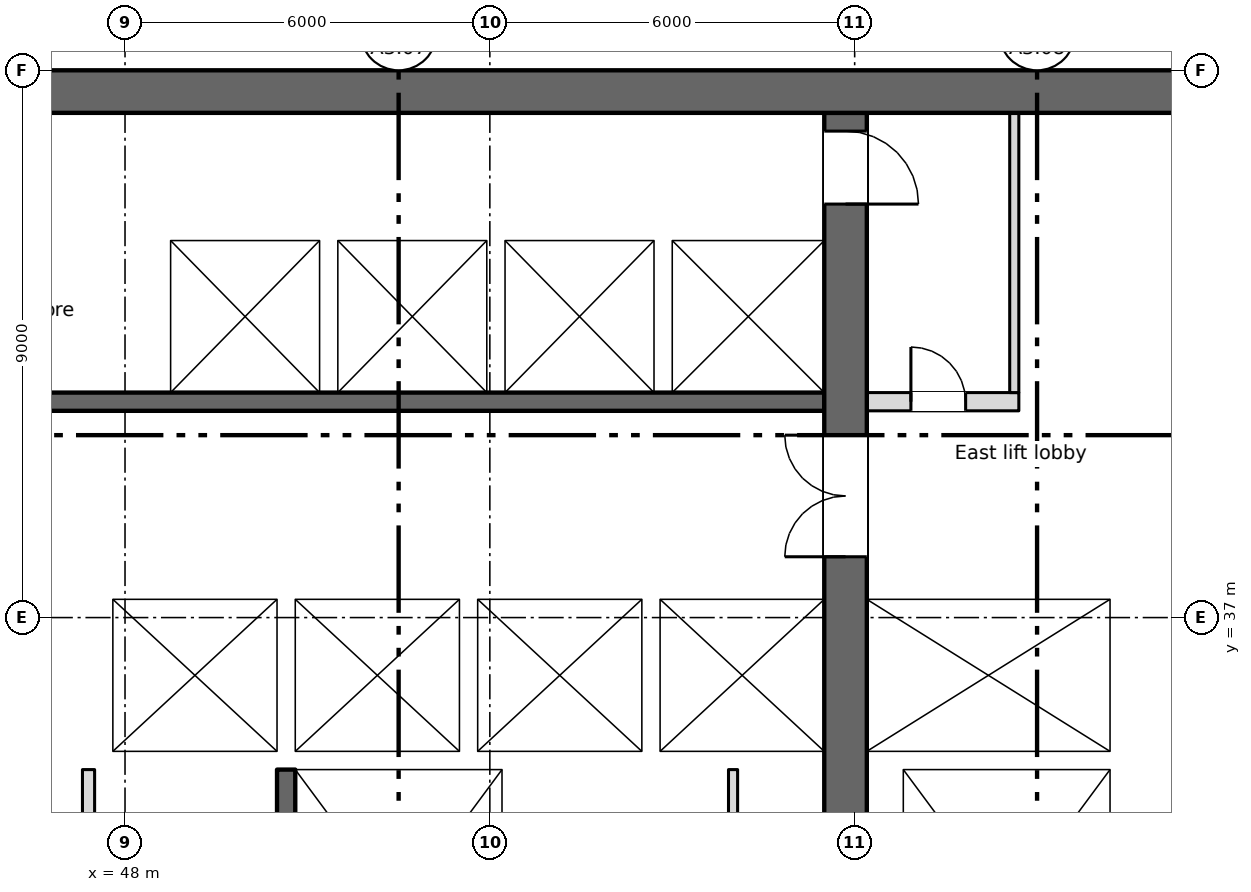
"""IFC4 building model, lengths in metres.
Left out: names, types, materials, properties, quantities, classifications, styles, units other than length and angle.
Written with IfcOpenShell. Run it as: python <this file> out.ifc"""

import sys

from ifc_helpers import new_model, si_unit, direction, frame, frame_2d, origin, place, context, subcontext, project, spatial, rectangle, extrude, element, fill, save


model = new_model("IFC4")
c1 = context("Model", 3, precision=1e-05, world=origin(), true_north=direction((0.0, 1.0)))
c2 = subcontext(c1, "Body", "Model", "MODEL_VIEW")
j1 = project(units=[si_unit("LENGTHUNIT", "METRE"), si_unit("PLANEANGLEUNIT", "RADIAN")], contexts=[c1])
p1 = place(None, origin())
s1 = spatial("IfcSite", under=j1, at=p1, CompositionType="ELEMENT")
p2 = place(p1, origin())
s2 = spatial("IfcBuilding", under=s1, at=p2, CompositionType="ELEMENT")
p3 = place(p2, frame((0.0, 0.0, 178.0)))
s3 = spatial("IfcBuildingStorey", under=s2, at=p3, CompositionType="ELEMENT", Elevation=178.0)
p4 = place(p3, frame((11.55, 45.65, 0.0), z_axis=(0.0, 0.0, 1.0), x_axis=(1.0, 0.0, 0.0)))
e1 = element("IfcWall", 1, at=p4, inside=s3, PredefinedType="SHEAR", context=c2, shape_type="SweptSolid", body=[
    extrude(rectangle(XDim=54.9, YDim=0.7, at=frame_2d((27.45, 0.0))), origin(), (0.0, 0.0, 1.0), 3.35),
])
p5 = place(p4, frame((1.2, 0.0, 0.6)))
e2 = element("IfcOpeningElement", 2, at=p5, cuts=e1, PredefinedType="OPENING", context=c2, shape_type="SweptSolid", body=[
    extrude(rectangle(XDim=0.6, YDim=2.4, at=frame_2d((0.3, 1.2))), frame((0.0, 0.36, 0.0), z_axis=(0.0, -1.0, 0.0), x_axis=(1.0, 0.0, 0.0)), (0.0, 0.0, 1.0), 0.72),
])
p6 = place(p3, frame((64.35, 34.8, 0.0), z_axis=(0.0, 0.0, 1.0), x_axis=(0.0, 1.0, 0.0)))
e3 = element("IfcWall", 3, at=p6, inside=s3, PredefinedType="SHEAR", context=c2, shape_type="SweptSolid", body=[
    extrude(rectangle(XDim=10.5, YDim=0.3, at=frame_2d((5.25, 0.0))), origin(), (0.0, 0.0, 1.0), 3.35),
])
p7 = place(p3, frame((59.85, 28.4, 0.0), z_axis=(0.0, 0.0, 1.0), x_axis=(0.0, 1.0, 0.0)))
e4 = element("IfcWall", 4, at=p7, inside=s3, PredefinedType="SHEAR", context=c2, shape_type="SweptSolid", body=[
    extrude(rectangle(XDim=16.9, YDim=0.7, at=frame_2d((8.45, 0.0))), origin(), (0.0, 0.0, 1.0), 3.35),
])
p8 = place(p7, frame((9.6, 0.0, 0.0)))
e5 = element("IfcOpeningElement", 5, at=p8, cuts=e4, PredefinedType="OPENING", context=c2, shape_type="SweptSolid", body=[
    extrude(rectangle(XDim=2.0, YDim=2.1, at=frame_2d((1.0, 1.05))), frame((0.0, 0.36, 0.0), z_axis=(0.0, -1.0, 0.0), x_axis=(1.0, 0.0, 0.0)), (0.0, 0.0, 1.0), 0.72),
])
p9 = place(p7, frame((15.4, 0.0, 0.0)))
e6 = element("IfcOpeningElement", 6, at=p9, cuts=e4, PredefinedType="OPENING", context=c2, shape_type="SweptSolid", body=[
    extrude(rectangle(XDim=1.2, YDim=2.1, at=frame_2d((0.6, 1.05))), frame((0.0, 0.36, 0.0), z_axis=(0.0, -1.0, 0.0), x_axis=(1.0, 0.0, 0.0)), (0.0, 0.0, 1.0), 0.72),
])
p10 = place(p3, frame((50.65, 34.5, 0.0), z_axis=(0.0, 0.0, 1.0), x_axis=(0.0, -1.0, 0.0)))
e7 = element("IfcWall", 7, at=p10, inside=s3, PredefinedType="SHEAR", context=c2, shape_type="SweptSolid", body=[
    extrude(rectangle(XDim=6.1, YDim=0.3, at=frame_2d((3.05, 0.0))), origin(), (0.0, 0.0, 1.0), 3.35),
])
p11 = place(p10, frame((4.95, 0.0, 0.0)))
e8 = element("IfcOpeningElement", 8, at=p11, cuts=e7, PredefinedType="OPENING", context=c2, shape_type="SweptSolid", body=[
    extrude(rectangle(XDim=1.1, YDim=2.1, at=frame_2d((0.55, 1.05))), frame((0.0, 0.16, 0.0), z_axis=(0.0, -1.0, 0.0), x_axis=(1.0, 0.0, 0.0)), (0.0, 0.0, 1.0), 0.32),
])
p12 = place(p3, frame((54.35, 28.4, 0.0), z_axis=(0.0, 0.0, 1.0), x_axis=(0.0, 1.0, 0.0)))
e9 = element("IfcWall", 9, at=p12, inside=s3, PredefinedType="SHEAR", context=c2, shape_type="SweptSolid", body=[
    extrude(rectangle(XDim=6.1, YDim=0.3, at=frame_2d((3.05, 0.0))), origin(), (0.0, 0.0, 1.0), 3.35),
])
p13 = place(p3, frame((60.5, 28.4, 0.0), z_axis=(0.0, 0.0, 1.0), x_axis=(0.0, 1.0, 0.0)))
e10 = element("IfcWall", 10, at=p13, inside=s3, PredefinedType="SHEAR", context=c2, shape_type="SweptSolid", body=[
    extrude(rectangle(XDim=6.1, YDim=0.6, at=frame_2d((3.05, 0.0))), origin(), (0.0, 0.0, 1.0), 3.35),
])
p14 = place(p3, frame((64.35, 28.4, 0.0), z_axis=(0.0, 0.0, 1.0), x_axis=(0.0, 1.0, 0.0)))
e11 = element("IfcWall", 11, at=p14, inside=s3, PredefinedType="SHEAR", context=c2, shape_type="SweptSolid", body=[
    extrude(rectangle(XDim=6.1, YDim=0.3, at=frame_2d((3.05, 0.0))), origin(), (0.0, 0.0, 1.0), 3.35),
])
p15 = place(p3, frame((47.3, 34.65, 0.0), z_axis=(0.0, 0.0, 1.0), x_axis=(1.0, 0.0, 0.0)))
e12 = element("IfcWall", 12, at=p15, inside=s3, PredefinedType="SHEAR", context=c2, shape_type="SweptSolid", body=[
    extrude(rectangle(XDim=12.2, YDim=0.3, at=frame_2d((6.1, 0.0))), origin(), (0.0, 0.0, 1.0), 3.35),
])
p16 = place(p15, frame((1.3, 0.0, 0.0)))
e13 = element("IfcOpeningElement", 13, at=p16, cuts=e12, PredefinedType="OPENING", context=c2, shape_type="SweptSolid", body=[
    extrude(rectangle(XDim=1.1, YDim=2.1, at=frame_2d((0.55, 1.05))), frame((0.0, 0.16, 0.0), z_axis=(0.0, -1.0, 0.0), x_axis=(1.0, 0.0, 0.0)), (0.0, 0.0, 1.0), 0.32),
])
p17 = place(p3, frame((60.2, 34.65, 0.0), z_axis=(0.0, 0.0, 1.0), x_axis=(1.0, 0.0, 0.0)))
e14 = element("IfcWall", 14, at=p17, inside=s3, PredefinedType="SHEAR", context=c2, shape_type="SweptSolid", body=[
    extrude(rectangle(XDim=4.3, YDim=0.3, at=frame_2d((2.15, 0.0))), origin(), (0.0, 0.0, 1.0), 3.35),
])
p18 = place(p3, frame((47.3, 37.45, 0.0), z_axis=(0.0, 0.0, 1.0), x_axis=(1.0, 0.0, 0.0)))
e15 = element("IfcWall", 15, at=p18, inside=s3, PredefinedType="SHEAR", context=c2, shape_type="SweptSolid", body=[
    extrude(rectangle(XDim=12.2, YDim=0.3, at=frame_2d((6.1, 0.0))), origin(), (0.0, 0.0, 1.0), 3.35),
])
p19 = place(p18, frame((4.3, 0.0, 0.0)))
e16 = element("IfcOpeningElement", 16, at=p19, cuts=e15, PredefinedType="OPENING", context=c2, shape_type="SweptSolid", body=[
    extrude(rectangle(XDim=1.1, YDim=2.1, at=frame_2d((0.55, 1.05))), frame((0.0, 0.16, 0.0), z_axis=(0.0, -1.0, 0.0), x_axis=(1.0, 0.0, 0.0)), (0.0, 0.0, 1.0), 0.32),
])
p20 = place(p18, frame((7.3, 0.0, 0.0)))
e17 = element("IfcOpeningElement", 17, at=p20, cuts=e15, PredefinedType="OPENING", context=c2, shape_type="SweptSolid", body=[
    extrude(rectangle(XDim=1.1, YDim=2.1, at=frame_2d((0.55, 1.05))), frame((0.0, 0.16, 0.0), z_axis=(0.0, -1.0, 0.0), x_axis=(1.0, 0.0, 0.0)), (0.0, 0.0, 1.0), 0.32),
])
p21 = place(p18, frame((10.3, 0.0, 0.0)))
e18 = element("IfcOpeningElement", 18, at=p21, cuts=e15, PredefinedType="OPENING", context=c2, shape_type="SweptSolid", body=[
    extrude(rectangle(XDim=1.1, YDim=2.1, at=frame_2d((0.55, 1.05))), frame((0.0, 0.16, 0.0), z_axis=(0.0, -1.0, 0.0), x_axis=(1.0, 0.0, 0.0)), (0.0, 0.0, 1.0), 0.32),
])
p22 = place(p3, frame((60.2, 37.45, 0.0), z_axis=(0.0, 0.0, 1.0), x_axis=(1.0, 0.0, 0.0)))
e19 = element("IfcWall", 19, at=p22, inside=s3, PredefinedType="SHEAR", context=c2, shape_type="SweptSolid", body=[
    extrude(rectangle(XDim=4.0, YDim=0.3, at=frame_2d((2.0, 0.0))), origin(), (0.0, 0.0, 1.0), 3.35),
])
p23 = place(p22, frame((1.45, 0.0, 0.0)))
e20 = element("IfcOpeningElement", 20, at=p23, cuts=e19, PredefinedType="OPENING", context=c2, shape_type="SweptSolid", body=[
    extrude(rectangle(XDim=1.1, YDim=2.1, at=frame_2d((0.55, 1.05))), frame((0.0, 0.16, 0.0), z_axis=(0.0, -1.0, 0.0), x_axis=(1.0, 0.0, 0.0)), (0.0, 0.0, 1.0), 0.32),
])
p24 = place(p3, frame((47.55, 34.8, 0.0), z_axis=(0.0, 0.0, 1.0), x_axis=(0.0, 1.0, 0.0)))
e21 = element("IfcWall", 21, at=p24, inside=s3, PredefinedType="SHEAR", context=c2, shape_type="SweptSolid", body=[
    extrude(rectangle(XDim=2.5, YDim=0.5, at=frame_2d((1.25, 0.0))), origin(), (0.0, 0.0, 1.0), 3.35),
])
p25 = place(p3, frame((50.65, 34.8, 0.0), z_axis=(0.0, 0.0, 1.0), x_axis=(0.0, 1.0, 0.0)))
e22 = element("IfcWall", 22, at=p25, inside=s3, PredefinedType="SHEAR", context=c2, shape_type="SweptSolid", body=[
    extrude(rectangle(XDim=2.5, YDim=0.3, at=frame_2d((1.25, 0.0))), origin(), (0.0, 0.0, 1.0), 3.35),
])
p26 = place(p3, frame((18.5, 40.55, 0.0), z_axis=(0.0, 0.0, 1.0), x_axis=(1.0, 0.0, 0.0)))
e23 = element("IfcWall", 23, at=p26, inside=s3, PredefinedType="SHEAR", context=c2, shape_type="SweptSolid", body=[
    extrude(rectangle(XDim=41.0, YDim=0.3, at=frame_2d((20.5, 0.0))), origin(), (0.0, 0.0, 1.0), 3.35),
])
p27 = place(p26, frame((2.15, 0.0, 0.0)))
e24 = element("IfcOpeningElement", 24, at=p27, cuts=e23, PredefinedType="OPENING", context=c2, shape_type="SweptSolid", body=[
    extrude(rectangle(XDim=0.9, YDim=2.1, at=frame_2d((0.45, 1.05))), frame((0.0, 0.16, 0.0), z_axis=(0.0, -1.0, 0.0), x_axis=(1.0, 0.0, 0.0)), (0.0, 0.0, 1.0), 0.32),
])
p28 = place(p26, frame((15.9, 0.0, 0.0)))
e25 = element("IfcOpeningElement", 25, at=p28, cuts=e23, PredefinedType="OPENING", context=c2, shape_type="SweptSolid", body=[
    extrude(rectangle(XDim=0.9, YDim=2.1, at=frame_2d((0.45, 1.05))), frame((0.0, 0.16, 0.0), z_axis=(0.0, -1.0, 0.0), x_axis=(1.0, 0.0, 0.0)), (0.0, 0.0, 1.0), 0.32),
])
p29 = place(p26, frame((21.4, 0.0, 0.0)))
e26 = element("IfcOpeningElement", 26, at=p29, cuts=e23, PredefinedType="OPENING", context=c2, shape_type="SweptSolid", body=[
    extrude(rectangle(XDim=0.9, YDim=2.1, at=frame_2d((0.45, 1.05))), frame((0.0, 0.16, 0.0), z_axis=(0.0, -1.0, 0.0), x_axis=(1.0, 0.0, 0.0)), (0.0, 0.0, 1.0), 0.32),
])
p30 = place(p26, frame((26.9, 0.0, 0.0)))
e27 = element("IfcOpeningElement", 27, at=p30, cuts=e23, PredefinedType="OPENING", context=c2, shape_type="SweptSolid", body=[
    extrude(rectangle(XDim=0.9, YDim=2.1, at=frame_2d((0.45, 1.05))), frame((0.0, 0.16, 0.0), z_axis=(0.0, -1.0, 0.0), x_axis=(1.0, 0.0, 0.0)), (0.0, 0.0, 1.0), 0.32),
])
p31 = place(p26, frame((6.175, 0.0, 0.0)))
e28 = element("IfcOpeningElement", 28, at=p31, cuts=e23, PredefinedType="OPENING", context=c2, shape_type="SweptSolid", body=[
    extrude(rectangle(XDim=1.1, YDim=2.1, at=frame_2d((0.55, 1.05))), frame((0.0, 0.16, 0.0), z_axis=(0.0, -1.0, 0.0), x_axis=(1.0, 0.0, 0.0)), (0.0, 0.0, 1.0), 0.32),
])
p32 = place(p26, frame((8.925, 0.0, 0.0)))
e29 = element("IfcOpeningElement", 29, at=p32, cuts=e23, PredefinedType="OPENING", context=c2, shape_type="SweptSolid", body=[
    extrude(rectangle(XDim=1.1, YDim=2.1, at=frame_2d((0.55, 1.05))), frame((0.0, 0.16, 0.0), z_axis=(0.0, -1.0, 0.0), x_axis=(1.0, 0.0, 0.0)), (0.0, 0.0, 1.0), 0.32),
])
p33 = place(p26, frame((11.675, 0.0, 0.0)))
e30 = element("IfcOpeningElement", 30, at=p33, cuts=e23, PredefinedType="OPENING", context=c2, shape_type="SweptSolid", body=[
    extrude(rectangle(XDim=1.1, YDim=2.1, at=frame_2d((0.55, 1.05))), frame((0.0, 0.16, 0.0), z_axis=(0.0, -1.0, 0.0), x_axis=(1.0, 0.0, 0.0)), (0.0, 0.0, 1.0), 0.32),
])
p34 = place(p26, frame((30.925, 0.0, 0.0)))
e31 = element("IfcOpeningElement", 31, at=p34, cuts=e23, PredefinedType="OPENING", context=c2, shape_type="SweptSolid", body=[
    extrude(rectangle(XDim=1.1, YDim=2.1, at=frame_2d((0.55, 1.05))), frame((0.0, 0.16, 0.0), z_axis=(0.0, -1.0, 0.0), x_axis=(1.0, 0.0, 0.0)), (0.0, 0.0, 1.0), 0.32),
])
p35 = place(p26, frame((33.675, 0.0, 0.0)))
e32 = element("IfcOpeningElement", 32, at=p35, cuts=e23, PredefinedType="OPENING", context=c2, shape_type="SweptSolid", body=[
    extrude(rectangle(XDim=1.1, YDim=2.1, at=frame_2d((0.55, 1.05))), frame((0.0, 0.16, 0.0), z_axis=(0.0, -1.0, 0.0), x_axis=(1.0, 0.0, 0.0)), (0.0, 0.0, 1.0), 0.32),
])
p36 = place(p26, frame((36.375, 0.0, 0.0)))
e33 = element("IfcOpeningElement", 33, at=p36, cuts=e23, PredefinedType="OPENING", context=c2, shape_type="SweptSolid", body=[
    extrude(rectangle(XDim=1.2, YDim=2.1, at=frame_2d((0.6, 1.05))), frame((0.0, 0.16, 0.0), z_axis=(0.0, -1.0, 0.0), x_axis=(1.0, 0.0, 0.0)), (0.0, 0.0, 1.0), 0.32),
])
p37 = place(p26, frame((39.15, 0.0, 0.0)))
e34 = element("IfcOpeningElement", 34, at=p37, cuts=e23, PredefinedType="OPENING", context=c2, shape_type="SweptSolid", body=[
    extrude(rectangle(XDim=1.2, YDim=2.1, at=frame_2d((0.6, 1.05))), frame((0.0, 0.16, 0.0), z_axis=(0.0, -1.0, 0.0), x_axis=(1.0, 0.0, 0.0)), (0.0, 0.0, 1.0), 0.32),
])
p38 = place(p3, frame((18.5, 43.35, 0.0), z_axis=(0.0, 0.0, 1.0), x_axis=(1.0, 0.0, 0.0)))
e35 = element("IfcWall", 35, at=p38, inside=s3, PredefinedType="SHEAR", context=c2, shape_type="SweptSolid", body=[
    extrude(rectangle(XDim=41.0, YDim=0.3, at=frame_2d((20.5, 0.0))), origin(), (0.0, 0.0, 1.0), 3.35),
])
p39 = place(p3, frame((60.2, 40.55, 0.0), z_axis=(0.0, 0.0, 1.0), x_axis=(1.0, 0.0, 0.0)))
e36 = element("IfcWall", 36, at=p39, inside=s3, PredefinedType="PARTITIONING", context=c2, shape_type="SweptSolid", body=[
    extrude(rectangle(XDim=2.5, YDim=0.3, at=frame_2d((1.25, 0.0))), origin(), (0.0, 0.0, 1.0), 3.35),
])
p40 = place(p39, frame((0.725, 0.0, 0.0)))
e37 = element("IfcOpeningElement", 37, at=p40, cuts=e36, PredefinedType="OPENING", context=c2, shape_type="SweptSolid", body=[
    extrude(rectangle(XDim=0.9, YDim=2.1, at=frame_2d((0.45, 1.05))), frame((0.0, 0.16, 0.0), z_axis=(0.0, -1.0, 0.0), x_axis=(1.0, 0.0, 0.0)), (0.0, 0.0, 1.0), 0.32),
])
for number, where, z_axis, x_axis in (
    (38, (53.65, 34.8, 0.0), (0.0, 0.0, 1.0), (0.0, 1.0, 0.0)),
    (39, (56.65, 34.8, 0.0), (0.0, 0.0, 1.0), (0.0, 1.0, 0.0)),
    (40, (48.6, 40.7, 0.0), (0.0, 0.0, 1.0), (0.0, 1.0, 0.0)),
    (41, (51.35, 40.7, 0.0), (0.0, 0.0, 1.0), (0.0, 1.0, 0.0)),
    (42, (54.1, 40.7, 0.0), (0.0, 0.0, 1.0), (0.0, 1.0, 0.0)),
    (43, (56.85, 40.7, 0.0), (0.0, 0.0, 1.0), (0.0, 1.0, 0.0)),
):
    element("IfcWall", number, at=place(p3, frame(where, z_axis=z_axis, x_axis=x_axis)), inside=s3, PredefinedType="SHEAR", context=c2, shape_type="SweptSolid", body=[
        extrude(rectangle(XDim=2.5, YDim=0.3, at=frame_2d((1.25, 0.0))), origin(), (0.0, 0.0, 1.0), 3.35),
    ])
p41 = place(p3, frame((47.4, 28.4, 0.0), z_axis=(0.0, 0.0, 1.0), x_axis=(0.0, 1.0, 0.0)))
e44 = element("IfcWall", 44, at=p41, inside=s3, PredefinedType="PARTITIONING", context=c2, shape_type="SweptSolid", body=[
    extrude(rectangle(XDim=6.1, YDim=0.2, at=frame_2d((3.05, 0.0))), origin(), (0.0, 0.0, 1.0), 3.35),
])
p42 = place(p3, frame((62.625, 40.7, 0.0), z_axis=(0.0, 0.0, 1.0), x_axis=(0.0, 1.0, 0.0)))
e45 = element("IfcWall", 45, at=p42, inside=s3, PredefinedType="PARTITIONING", context=c2, shape_type="SweptSolid", body=[
    extrude(rectangle(XDim=4.6, YDim=0.15, at=frame_2d((2.3, 0.0))), origin(), (0.0, 0.0, 1.0), 3.35),
])
p43 = place(p3, frame((58.0, 28.4, 0.0), z_axis=(0.0, 0.0, 1.0), x_axis=(0.0, 1.0, 0.0)))
e46 = element("IfcWall", 46, at=p43, inside=s3, PredefinedType="PARTITIONING", context=c2, shape_type="SweptSolid", body=[
    extrude(rectangle(XDim=6.1, YDim=0.15, at=frame_2d((3.05, 0.0))), origin(), (0.0, 0.0, 1.0), 3.35),
])
p44 = place(p40, origin())
e47 = element("IfcDoor", 47, at=p44, inside=s3, OperationType="SINGLE_SWING_LEFT", PredefinedType="DOOR", context=c2, shape_type="SweptSolid", body=[
    extrude(rectangle(XDim=0.9, YDim=2.1, at=frame_2d((0.45, 1.05))), frame((0.0, 0.025, 0.0), z_axis=(0.0, -1.0, 0.0), x_axis=(1.0, 0.0, 0.0)), (0.0, 0.0, 1.0), 0.05),
])
fill(e37, e47)
p45 = place(p19, origin())
e48 = element("IfcDoor", 48, at=p45, inside=s3, OperationType="SLIDING_TO_LEFT", PredefinedType="DOOR", context=c2, shape_type="SweptSolid", body=[
    extrude(rectangle(XDim=1.1, YDim=2.1, at=frame_2d((0.55, 1.05))), frame((0.0, 0.025, 0.0), z_axis=(0.0, -1.0, 0.0), x_axis=(1.0, 0.0, 0.0)), (0.0, 0.0, 1.0), 0.05),
])
fill(e16, e48)
p46 = place(p20, origin())
e49 = element("IfcDoor", 49, at=p46, inside=s3, OperationType="SLIDING_TO_LEFT", PredefinedType="DOOR", context=c2, shape_type="SweptSolid", body=[
    extrude(rectangle(XDim=1.1, YDim=2.1, at=frame_2d((0.55, 1.05))), frame((0.0, 0.025, 0.0), z_axis=(0.0, -1.0, 0.0), x_axis=(1.0, 0.0, 0.0)), (0.0, 0.0, 1.0), 0.05),
])
fill(e17, e49)
p47 = place(p21, origin())
e50 = element("IfcDoor", 50, at=p47, inside=s3, OperationType="SLIDING_TO_LEFT", PredefinedType="DOOR", context=c2, shape_type="SweptSolid", body=[
    extrude(rectangle(XDim=1.1, YDim=2.1, at=frame_2d((0.55, 1.05))), frame((0.0, 0.025, 0.0), z_axis=(0.0, -1.0, 0.0), x_axis=(1.0, 0.0, 0.0)), (0.0, 0.0, 1.0), 0.05),
])
fill(e18, e50)
p48 = place(p34, origin())
e51 = element("IfcDoor", 51, at=p48, inside=s3, OperationType="SLIDING_TO_LEFT", PredefinedType="DOOR", context=c2, shape_type="SweptSolid", body=[
    extrude(rectangle(XDim=1.1, YDim=2.1, at=frame_2d((0.55, 1.05))), frame((0.0, 0.025, 0.0), z_axis=(0.0, -1.0, 0.0), x_axis=(1.0, 0.0, 0.0)), (0.0, 0.0, 1.0), 0.05),
])
fill(e31, e51)
p49 = place(p35, origin())
e52 = element("IfcDoor", 52, at=p49, inside=s3, OperationType="SLIDING_TO_LEFT", PredefinedType="DOOR", context=c2, shape_type="SweptSolid", body=[
    extrude(rectangle(XDim=1.1, YDim=2.1, at=frame_2d((0.55, 1.05))), frame((0.0, 0.025, 0.0), z_axis=(0.0, -1.0, 0.0), x_axis=(1.0, 0.0, 0.0)), (0.0, 0.0, 1.0), 0.05),
])
fill(e32, e52)
p50 = place(p36, origin())
e53 = element("IfcDoor", 53, at=p50, inside=s3, OperationType="SLIDING_TO_LEFT", PredefinedType="DOOR", context=c2, shape_type="SweptSolid", body=[
    extrude(rectangle(XDim=1.2, YDim=2.1, at=frame_2d((0.6, 1.05))), frame((0.0, 0.025, 0.0), z_axis=(0.0, -1.0, 0.0), x_axis=(1.0, 0.0, 0.0)), (0.0, 0.0, 1.0), 0.05),
])
fill(e33, e53)
p51 = place(p37, origin())
e54 = element("IfcDoor", 54, at=p51, inside=s3, OperationType="SLIDING_TO_LEFT", PredefinedType="DOOR", context=c2, shape_type="SweptSolid", body=[
    extrude(rectangle(XDim=1.2, YDim=2.1, at=frame_2d((0.6, 1.05))), frame((0.0, 0.025, 0.0), z_axis=(0.0, -1.0, 0.0), x_axis=(1.0, 0.0, 0.0)), (0.0, 0.0, 1.0), 0.05),
])
fill(e34, e54)
p52 = place(p23, origin())
e55 = element("IfcDoor", 55, at=p52, inside=s3, OperationType="SLIDING_TO_LEFT", PredefinedType="DOOR", context=c2, shape_type="SweptSolid", body=[
    extrude(rectangle(XDim=1.1, YDim=2.1, at=frame_2d((0.55, 1.05))), frame((0.0, 0.025, 0.0), z_axis=(0.0, -1.0, 0.0), x_axis=(1.0, 0.0, 0.0)), (0.0, 0.0, 1.0), 0.05),
])
fill(e20, e55)
p53 = place(p16, origin())
e56 = element("IfcDoor", 56, at=p53, inside=s3, OperationType="SLIDING_TO_LEFT", PredefinedType="DOOR", context=c2, shape_type="SweptSolid", body=[
    extrude(rectangle(XDim=1.1, YDim=2.1, at=frame_2d((0.55, 1.05))), frame((0.0, 0.025, 0.0), z_axis=(0.0, -1.0, 0.0), x_axis=(1.0, 0.0, 0.0)), (0.0, 0.0, 1.0), 0.05),
])
fill(e13, e56)
p54 = place(p8, origin())
e57 = element("IfcDoor", 57, at=p54, inside=s3, OperationType="DOUBLE_DOOR_SINGLE_SWING", PredefinedType="DOOR", context=c2, shape_type="SweptSolid", body=[
    extrude(rectangle(XDim=2.0, YDim=2.1, at=frame_2d((1.0, 1.05))), frame((0.0, 0.025, 0.0), z_axis=(0.0, -1.0, 0.0), x_axis=(1.0, 0.0, 0.0)), (0.0, 0.0, 1.0), 0.05),
])
fill(e5, e57)
p55 = place(p9, origin())
e58 = element("IfcDoor", 58, at=p55, inside=s3, OperationType="SINGLE_SWING_LEFT", PredefinedType="DOOR", context=c2, shape_type="SweptSolid", body=[
    extrude(rectangle(XDim=1.2, YDim=2.1, at=frame_2d((0.6, 1.05))), frame((0.0, 0.025, 0.0), z_axis=(0.0, -1.0, 0.0), x_axis=(1.0, 0.0, 0.0)), (0.0, 0.0, 1.0), 0.05),
])
fill(e6, e58)
save(model, sys.argv[1])
